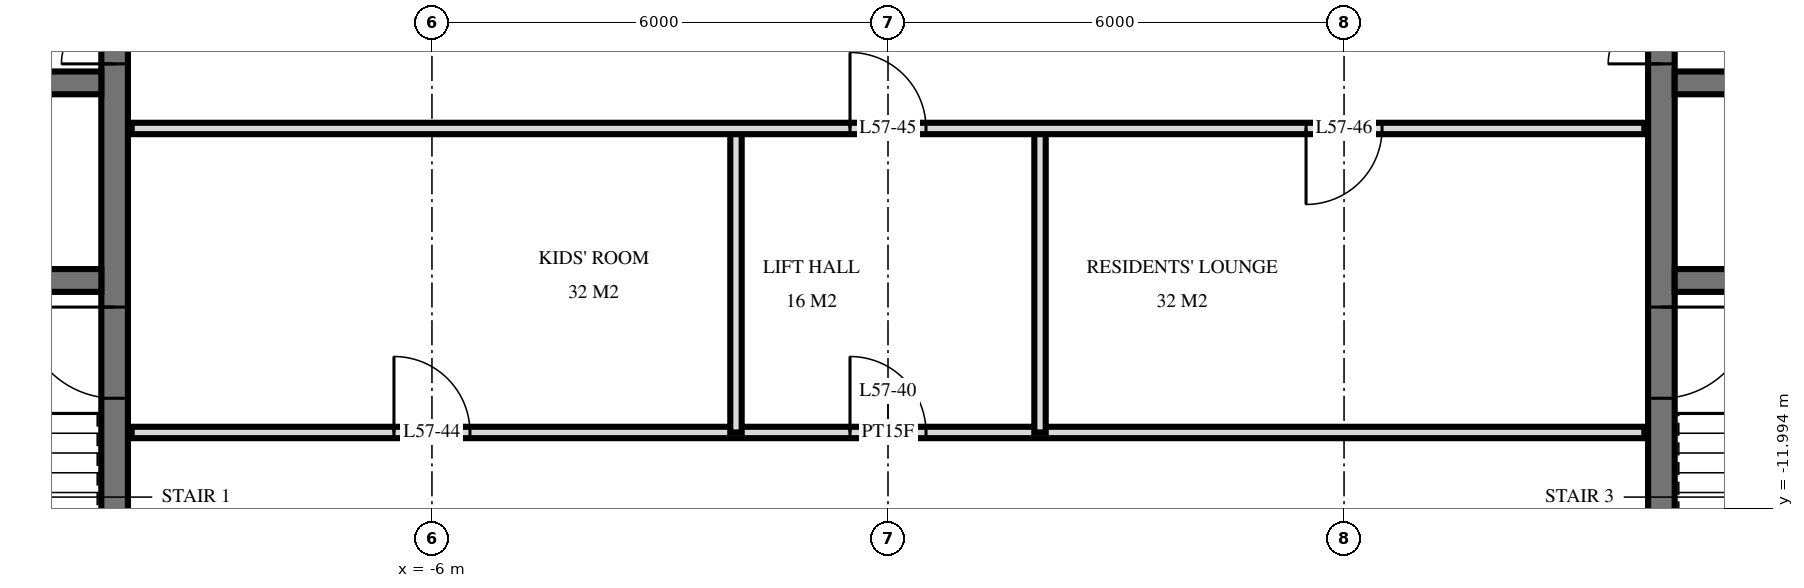
"""IFC4 building model, lengths in metres.
Left out: names, types, materials, properties, quantities, classifications, styles, units other than length and angle.
Written with IfcOpenShell. Run it as: python <this file> out.ifc"""

import sys

from ifc_helpers import new_model, si_unit, direction, frame, frame_2d, origin, place, context, subcontext, project, spatial, rectangle, extrude, element, fill, save


model = new_model("IFC4")
c1 = context("Model", 3, precision=1e-05, world=origin(), true_north=direction((0.0, 1.0)))
c2 = subcontext(c1, "Body", "Model", "MODEL_VIEW")
j1 = project(units=[si_unit("LENGTHUNIT", "METRE"), si_unit("PLANEANGLEUNIT", "RADIAN")], contexts=[c1])
p1 = place(None, origin())
s1 = spatial("IfcSite", under=j1, at=p1, CompositionType="ELEMENT")
p2 = place(p1, origin())
s2 = spatial("IfcBuilding", under=s1, at=p2, CompositionType="ELEMENT")
p3 = place(p2, frame((0.0, 0.0, 218.6)))
s3 = spatial("IfcBuildingStorey", under=s2, at=p3, CompositionType="ELEMENT", Elevation=218.6)
p4 = place(p3, frame((-10.175, -14.55, 0.0), z_axis=(0.0, 0.0, 1.0), x_axis=(0.0, 1.0, 0.0)))
e1 = element("IfcWall", 1, at=p4, inside=s3, PredefinedType="SHEAR", context=c2, shape_type="SweptSolid", body=[
    extrude(rectangle(XDim=14.1, YDim=0.35, at=frame_2d((7.05, 0.0))), origin(), (0.0, 0.0, 1.0), 3.5),
])
p5 = place(p4, frame((8.4, 0.0, 0.0)))
e2 = element("IfcOpeningElement", 2, at=p5, cuts=e1, PredefinedType="OPENING", context=c2, shape_type="SweptSolid", body=[
    extrude(rectangle(XDim=1.4, YDim=2.4, at=frame_2d((0.7, 1.2))), frame((0.0, 0.185, 0.0), z_axis=(0.0, -1.0, 0.0), x_axis=(1.0, 0.0, 0.0)), (0.0, 0.0, 1.0), 0.37),
])
p6 = place(p4, frame((10.0, 0.0, 0.0)))
e3 = element("IfcOpeningElement", 3, at=p6, cuts=e1, PredefinedType="OPENING", context=c2, shape_type="SweptSolid", body=[
    extrude(rectangle(XDim=1.4, YDim=2.4, at=frame_2d((0.7, 1.2))), frame((0.0, 0.185, 0.0), z_axis=(0.0, -1.0, 0.0), x_axis=(1.0, 0.0, 0.0)), (0.0, 0.0, 1.0), 0.37),
])
p7 = place(p4, frame((4.0, 0.0, 0.0)))
e4 = element("IfcOpeningElement", 4, at=p7, cuts=e1, PredefinedType="OPENING", context=c2, shape_type="SweptSolid", body=[
    extrude(rectangle(XDim=1.2, YDim=2.1, at=frame_2d((0.6, 1.05))), frame((0.0, 0.185, 0.0), z_axis=(0.0, -1.0, 0.0), x_axis=(1.0, 0.0, 0.0)), (0.0, 0.0, 1.0), 0.37),
])
p8 = place(p3, frame((-24.05, -6.4, 0.0), z_axis=(0.0, 0.0, 1.0), x_axis=(1.0, 0.0, 0.0)))
e5 = element("IfcWall", 5, at=p8, inside=s3, PredefinedType="SHEAR", context=c2, shape_type="SweptSolid", body=[
    extrude(rectangle(XDim=13.7, YDim=0.3, at=frame_2d((6.85, 0.0))), origin(), (0.0, 0.0, 1.0), 3.5),
])
p9 = place(p8, frame((0.55, 0.0, 0.0)))
e6 = element("IfcOpeningElement", 6, at=p9, cuts=e5, PredefinedType="OPENING", context=c2, shape_type="SweptSolid", body=[
    extrude(rectangle(XDim=1.1, YDim=2.1, at=frame_2d((0.55, 1.05))), frame((0.0, 0.16, 0.0), z_axis=(0.0, -1.0, 0.0), x_axis=(1.0, 0.0, 0.0)), (0.0, 0.0, 1.0), 0.32),
])
p10 = place(p8, frame((5.8, 0.0, 0.0)))
e7 = element("IfcOpeningElement", 7, at=p10, cuts=e5, PredefinedType="OPENING", context=c2, shape_type="SweptSolid", body=[
    extrude(rectangle(XDim=1.1, YDim=2.1, at=frame_2d((0.55, 1.05))), frame((0.0, 0.16, 0.0), z_axis=(0.0, -1.0, 0.0), x_axis=(1.0, 0.0, 0.0)), (0.0, 0.0, 1.0), 0.32),
])
p11 = place(p3, frame((-24.05, -9.0, 0.0), z_axis=(0.0, 0.0, 1.0), x_axis=(1.0, 0.0, 0.0)))
e8 = element("IfcWall", 8, at=p11, inside=s3, PredefinedType="SHEAR", context=c2, shape_type="SweptSolid", body=[
    extrude(rectangle(XDim=13.7, YDim=0.3, at=frame_2d((6.85, 0.0))), origin(), (0.0, 0.0, 1.0), 3.5),
])
p12 = place(p11, frame((8.8, 0.0, 0.0)))
e9 = element("IfcOpeningElement", 9, at=p12, cuts=e8, PredefinedType="OPENING", context=c2, shape_type="SweptSolid", body=[
    extrude(rectangle(XDim=1.1, YDim=2.1, at=frame_2d((0.55, 1.05))), frame((0.0, 0.16, 0.0), z_axis=(0.0, -1.0, 0.0), x_axis=(1.0, 0.0, 0.0)), (0.0, 0.0, 1.0), 0.32),
])
p13 = place(p3, frame((10.175, -14.55, 0.0), z_axis=(0.0, 0.0, 1.0), x_axis=(0.0, 1.0, 0.0)))
e10 = element("IfcWall", 10, at=p13, inside=s3, PredefinedType="SHEAR", context=c2, shape_type="SweptSolid", body=[
    extrude(rectangle(XDim=14.1, YDim=0.35, at=frame_2d((7.05, 0.0))), origin(), (0.0, 0.0, 1.0), 3.5),
])
p14 = place(p13, frame((8.4, 0.0, 0.0)))
e11 = element("IfcOpeningElement", 11, at=p14, cuts=e10, PredefinedType="OPENING", context=c2, shape_type="SweptSolid", body=[
    extrude(rectangle(XDim=1.4, YDim=2.4, at=frame_2d((0.7, 1.2))), frame((0.0, 0.185, 0.0), z_axis=(0.0, -1.0, 0.0), x_axis=(1.0, 0.0, 0.0)), (0.0, 0.0, 1.0), 0.37),
])
p15 = place(p13, frame((10.0, 0.0, 0.0)))
e12 = element("IfcOpeningElement", 12, at=p15, cuts=e10, PredefinedType="OPENING", context=c2, shape_type="SweptSolid", body=[
    extrude(rectangle(XDim=1.4, YDim=2.4, at=frame_2d((0.7, 1.2))), frame((0.0, 0.185, 0.0), z_axis=(0.0, -1.0, 0.0), x_axis=(1.0, 0.0, 0.0)), (0.0, 0.0, 1.0), 0.37),
])
p16 = place(p13, frame((4.0, 0.0, 0.0)))
e13 = element("IfcOpeningElement", 13, at=p16, cuts=e10, PredefinedType="OPENING", context=c2, shape_type="SweptSolid", body=[
    extrude(rectangle(XDim=1.2, YDim=2.1, at=frame_2d((0.6, 1.05))), frame((0.0, 0.185, 0.0), z_axis=(0.0, -1.0, 0.0), x_axis=(1.0, 0.0, 0.0)), (0.0, 0.0, 1.0), 0.37),
])
p17 = place(p3, frame((10.35, -6.4, 0.0), z_axis=(0.0, 0.0, 1.0), x_axis=(1.0, 0.0, 0.0)))
e14 = element("IfcWall", 14, at=p17, inside=s3, PredefinedType="SHEAR", context=c2, shape_type="SweptSolid", body=[
    extrude(rectangle(XDim=13.7, YDim=0.3, at=frame_2d((6.85, 0.0))), origin(), (0.0, 0.0, 1.0), 3.5),
])
p18 = place(p17, frame((12.05, 0.0, 0.0)))
e15 = element("IfcOpeningElement", 15, at=p18, cuts=e14, PredefinedType="OPENING", context=c2, shape_type="SweptSolid", body=[
    extrude(rectangle(XDim=1.1, YDim=2.1, at=frame_2d((0.55, 1.05))), frame((0.0, 0.16, 0.0), z_axis=(0.0, -1.0, 0.0), x_axis=(1.0, 0.0, 0.0)), (0.0, 0.0, 1.0), 0.32),
])
p19 = place(p17, frame((6.8, 0.0, 0.0)))
e16 = element("IfcOpeningElement", 16, at=p19, cuts=e14, PredefinedType="OPENING", context=c2, shape_type="SweptSolid", body=[
    extrude(rectangle(XDim=1.1, YDim=2.1, at=frame_2d((0.55, 1.05))), frame((0.0, 0.16, 0.0), z_axis=(0.0, -1.0, 0.0), x_axis=(1.0, 0.0, 0.0)), (0.0, 0.0, 1.0), 0.32),
])
p20 = place(p3, frame((10.35, -9.0, 0.0), z_axis=(0.0, 0.0, 1.0), x_axis=(1.0, 0.0, 0.0)))
e17 = element("IfcWall", 17, at=p20, inside=s3, PredefinedType="SHEAR", context=c2, shape_type="SweptSolid", body=[
    extrude(rectangle(XDim=13.7, YDim=0.3, at=frame_2d((6.85, 0.0))), origin(), (0.0, 0.0, 1.0), 3.5),
])
p21 = place(p20, frame((3.8, 0.0, 0.0)))
e18 = element("IfcOpeningElement", 18, at=p21, cuts=e17, PredefinedType="OPENING", context=c2, shape_type="SweptSolid", body=[
    extrude(rectangle(XDim=1.1, YDim=2.1, at=frame_2d((0.55, 1.05))), frame((0.0, 0.16, 0.0), z_axis=(0.0, -1.0, 0.0), x_axis=(1.0, 0.0, 0.0)), (0.0, 0.0, 1.0), 0.32),
])
for number, where, z_axis, x_axis in (
    (19, (2.0, -11.0, 0.0), (0.0, 0.0, 1.0), (0.0, 1.0, 0.0)),
    (20, (-2.0, -11.0, 0.0), (0.0, 0.0, 1.0), (0.0, 1.0, 0.0)),
):
    element("IfcWall", number, at=place(p3, frame(where, z_axis=z_axis, x_axis=x_axis)), inside=s3, PredefinedType="PARTITIONING", context=c2, shape_type="SweptSolid", body=[
        extrude(rectangle(XDim=4.0, YDim=0.15, at=frame_2d((2.0, 0.0))), origin(), (0.0, 0.0, 1.0), 3.22),
    ])
p22 = place(p3, frame((-9.95, -11.0, 0.0), z_axis=(0.0, 0.0, 1.0), x_axis=(1.0, 0.0, 0.0)))
e21 = element("IfcWall", 21, at=p22, inside=s3, PredefinedType="PARTITIONING", context=c2, shape_type="SweptSolid", body=[
    extrude(rectangle(XDim=19.9, YDim=0.15, at=frame_2d((9.95, 0.0))), origin(), (0.0, 0.0, 1.0), 3.22),
])
p23 = place(p22, frame((9.45, 0.0, 0.0)))
e22 = element("IfcOpeningElement", 22, at=p23, cuts=e21, PredefinedType="OPENING", context=c2, shape_type="SweptSolid", body=[
    extrude(rectangle(XDim=1.0, YDim=2.1, at=frame_2d((0.5, 1.05))), frame((0.0, 0.085, 0.0), z_axis=(0.0, -1.0, 0.0), x_axis=(1.0, 0.0, 0.0)), (0.0, 0.0, 1.0), 0.17),
])
p24 = place(p22, frame((3.45, 0.0, 0.0)))
e23 = element("IfcOpeningElement", 23, at=p24, cuts=e21, PredefinedType="OPENING", context=c2, shape_type="SweptSolid", body=[
    extrude(rectangle(XDim=1.0, YDim=2.1, at=frame_2d((0.5, 1.05))), frame((0.0, 0.085, 0.0), z_axis=(0.0, -1.0, 0.0), x_axis=(1.0, 0.0, 0.0)), (0.0, 0.0, 1.0), 0.17),
])
p25 = place(p3, frame((-9.95, -7.0, 0.0), z_axis=(0.0, 0.0, 1.0), x_axis=(1.0, 0.0, 0.0)))
e24 = element("IfcWall", 24, at=p25, inside=s3, PredefinedType="PARTITIONING", context=c2, shape_type="SweptSolid", body=[
    extrude(rectangle(XDim=19.9, YDim=0.15, at=frame_2d((9.95, 0.0))), origin(), (0.0, 0.0, 1.0), 3.22),
])
p26 = place(p25, frame((9.45, 0.0, 0.0)))
e25 = element("IfcOpeningElement", 25, at=p26, cuts=e24, PredefinedType="OPENING", context=c2, shape_type="SweptSolid", body=[
    extrude(rectangle(XDim=1.0, YDim=2.1, at=frame_2d((0.5, 1.05))), frame((0.0, 0.085, 0.0), z_axis=(0.0, -1.0, 0.0), x_axis=(1.0, 0.0, 0.0)), (0.0, 0.0, 1.0), 0.17),
])
p27 = place(p25, frame((15.45, 0.0, 0.0)))
e26 = element("IfcOpeningElement", 26, at=p27, cuts=e24, PredefinedType="OPENING", context=c2, shape_type="SweptSolid", body=[
    extrude(rectangle(XDim=1.0, YDim=2.1, at=frame_2d((0.5, 1.05))), frame((0.0, 0.085, 0.0), z_axis=(0.0, -1.0, 0.0), x_axis=(1.0, 0.0, 0.0)), (0.0, 0.0, 1.0), 0.17),
])
p28 = place(p5, origin())
e27 = element("IfcDoor", 27, at=p28, inside=s3, OperationType="DOUBLE_DOOR_SINGLE_SWING", PredefinedType="DOOR", context=c2, shape_type="SweptSolid", body=[
    extrude(rectangle(XDim=1.4, YDim=2.4, at=frame_2d((0.7, 1.2))), frame((0.0, 0.025, 0.0), z_axis=(0.0, -1.0, 0.0), x_axis=(1.0, 0.0, 0.0)), (0.0, 0.0, 1.0), 0.05),
])
fill(e2, e27)
p29 = place(p7, origin())
e28 = element("IfcDoor", 28, at=p29, inside=s3, OperationType="SINGLE_SWING_LEFT", PredefinedType="DOOR", context=c2, shape_type="SweptSolid", body=[
    extrude(rectangle(XDim=1.2, YDim=2.1, at=frame_2d((0.6, 1.05))), frame((0.0, 0.025, 0.0), z_axis=(0.0, -1.0, 0.0), x_axis=(1.0, 0.0, 0.0)), (0.0, 0.0, 1.0), 0.05),
])
fill(e4, e28)
p30 = place(p14, origin())
e29 = element("IfcDoor", 29, at=p30, inside=s3, OperationType="DOUBLE_DOOR_SINGLE_SWING", PredefinedType="DOOR", context=c2, shape_type="SweptSolid", body=[
    extrude(rectangle(XDim=1.4, YDim=2.4, at=frame_2d((0.7, 1.2))), frame((0.0, 0.025, 0.0), z_axis=(0.0, -1.0, 0.0), x_axis=(1.0, 0.0, 0.0)), (0.0, 0.0, 1.0), 0.05),
])
fill(e11, e29)
p31 = place(p16, frame((0.6, 0.0, 0.0), z_axis=(0.0, 0.0, 1.0), x_axis=(-1.0, 0.0, 0.0)))
e30 = element("IfcDoor", 30, at=p31, inside=s3, OperationType="SINGLE_SWING_RIGHT", PredefinedType="DOOR", context=c2, shape_type="SweptSolid", body=[
    extrude(rectangle(XDim=1.2, YDim=2.1, at=frame_2d((0.0, 1.05))), frame((0.0, -0.025, 0.0), z_axis=(0.0, 1.0, 0.0), x_axis=(-1.0, 0.0, 0.0)), (0.0, 0.0, 1.0), 0.05),
])
fill(e13, e30)
p32 = place(p23, origin())
e31 = element("IfcDoor", 31, at=p32, inside=s3, OperationType="SINGLE_SWING_RIGHT", PredefinedType="DOOR", context=c2, shape_type="SweptSolid", body=[
    extrude(rectangle(XDim=1.0, YDim=2.1, at=frame_2d((0.5, 1.05))), frame((0.0, 0.025, 0.0), z_axis=(0.0, -1.0, 0.0), x_axis=(1.0, 0.0, 0.0)), (0.0, 0.0, 1.0), 0.05),
])
fill(e22, e31)
p33 = place(p24, origin())
e32 = element("IfcDoor", 32, at=p33, inside=s3, OperationType="SINGLE_SWING_RIGHT", PredefinedType="DOOR", context=c2, shape_type="SweptSolid", body=[
    extrude(rectangle(XDim=1.0, YDim=2.1, at=frame_2d((0.5, 1.05))), frame((0.0, 0.025, 0.0), z_axis=(0.0, -1.0, 0.0), x_axis=(1.0, 0.0, 0.0)), (0.0, 0.0, 1.0), 0.05),
])
fill(e23, e32)
p34 = place(p26, origin())
e33 = element("IfcDoor", 33, at=p34, inside=s3, OperationType="SINGLE_SWING_RIGHT", PredefinedType="DOOR", context=c2, shape_type="SweptSolid", body=[
    extrude(rectangle(XDim=1.0, YDim=2.1, at=frame_2d((0.5, 1.05))), frame((0.0, 0.025, 0.0), z_axis=(0.0, -1.0, 0.0), x_axis=(1.0, 0.0, 0.0)), (0.0, 0.0, 1.0), 0.05),
])
fill(e25, e33)
p35 = place(p27, frame((0.5, 0.0, 0.0), z_axis=(0.0, 0.0, 1.0), x_axis=(-1.0, 0.0, 0.0)))
e34 = element("IfcDoor", 34, at=p35, inside=s3, OperationType="SINGLE_SWING_LEFT", PredefinedType="DOOR", context=c2, shape_type="SweptSolid", body=[
    extrude(rectangle(XDim=1.0, YDim=2.1, at=frame_2d((0.0, 1.05))), frame((0.0, -0.025, 0.0), z_axis=(0.0, 1.0, 0.0), x_axis=(-1.0, 0.0, 0.0)), (0.0, 0.0, 1.0), 0.05),
])
fill(e26, e34)
save(model, sys.argv[1])
